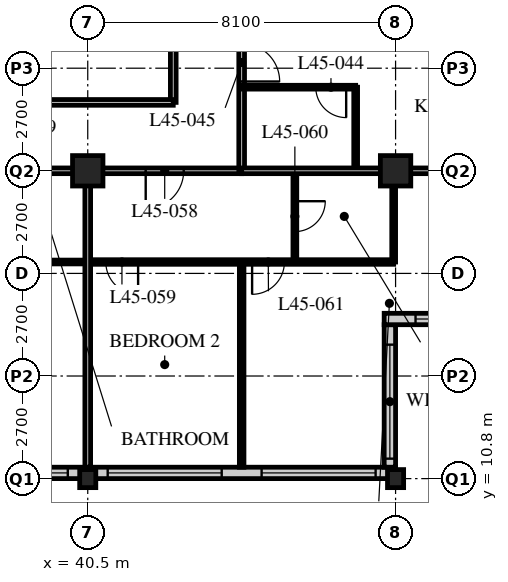
"""IFC4 building model, lengths in metres.
Left out: names, types, materials, properties, quantities, classifications, styles, units other than length and angle.
Written with IfcOpenShell. Run it as: python <this file> out.ifc"""

import sys

from ifc_helpers import new_model, si_unit, direction, frame, frame_2d, origin, origin_2d, place, context, subcontext, project, spatial, rectangle, hollow_rectangle, i_section, extrude, element, fill, save


model = new_model("IFC4")
c1 = context("Model", 3, precision=1e-05, world=origin(), true_north=direction((0.0, 1.0)))
c2 = subcontext(c1, "Body", "Model", "MODEL_VIEW")
j1 = project(units=[si_unit("LENGTHUNIT", "METRE"), si_unit("PLANEANGLEUNIT", "RADIAN")], contexts=[c1])
p1 = place(None, origin())
s1 = spatial("IfcSite", under=j1, at=p1, CompositionType="ELEMENT")
p2 = place(p1, origin())
s2 = spatial("IfcBuilding", under=s1, at=p2, CompositionType="ELEMENT")
p3 = place(p2, frame((0.0, 0.0, 177.6)))
s3 = spatial("IfcBuildingStorey", under=s2, at=p3, CompositionType="ELEMENT", Elevation=177.6)
p4 = place(p3, frame((40.5, 10.8, 0.0), z_axis=(0.0, 0.0, 1.0), x_axis=(1.0, 0.0, 0.0)))
e1 = element("IfcColumn", 1, at=p4, inside=s3, PredefinedType="COLUMN", context=c2, shape_type="SweptSolid", body=[
    extrude(i_section(OverallWidth=0.424, OverallDepth=0.475, WebThickness=0.048, FlangeThickness=0.077, FilletRadius=0.015, at=origin_2d()), origin(), (0.0, 0.0, 1.0), 3.6),
])
p5 = place(p3, frame((40.5, 18.9, 0.0), z_axis=(0.0, 0.0, 1.0), x_axis=(1.0, 0.0, 0.0)))
e2 = element("IfcColumn", 2, at=p5, inside=s3, PredefinedType="COLUMN", context=c2, shape_type="SweptSolid", body=[
    extrude(hollow_rectangle(XDim=0.8, YDim=0.8, WallThickness=0.08, at=origin_2d()), origin(), (0.0, 0.0, 1.0), 3.6),
])
p6 = place(p3, frame((48.6, 10.8, 0.0), z_axis=(0.0, 0.0, 1.0), x_axis=(1.0, 0.0, 0.0)))
e3 = element("IfcColumn", 3, at=p6, inside=s3, PredefinedType="COLUMN", context=c2, shape_type="SweptSolid", body=[
    extrude(i_section(OverallWidth=0.424, OverallDepth=0.475, WebThickness=0.048, FlangeThickness=0.077, FilletRadius=0.015, at=origin_2d()), origin(), (0.0, 0.0, 1.0), 3.6),
])
p7 = place(p3, frame((48.6, 18.9, 0.0), z_axis=(0.0, 0.0, 1.0), x_axis=(1.0, 0.0, 0.0)))
e4 = element("IfcColumn", 4, at=p7, inside=s3, PredefinedType="COLUMN", context=c2, shape_type="SweptSolid", body=[
    extrude(hollow_rectangle(XDim=0.8, YDim=0.8, WallThickness=0.08, at=origin_2d()), origin(), (0.0, 0.0, 1.0), 3.6),
])
p8 = place(p3, frame((8.4, 10.95, 0.0), z_axis=(0.0, 0.0, 1.0), x_axis=(1.0, 0.0, 0.0)))
e5 = element("IfcWall", 5, at=p8, inside=s3, PredefinedType="SOLIDWALL", context=c2, shape_type="SweptSolid", body=[
    extrude(rectangle(XDim=40.2, YDim=0.3, at=frame_2d((20.1, 0.0))), origin(), (0.0, 0.0, 1.0), 3.39),
])
p9 = place(p8, frame((0.225, 0.0, 0.6)))
e6 = element("IfcOpeningElement", 6, at=p9, cuts=e5, PredefinedType="OPENING", context=c2, shape_type="SweptSolid", body=[
    extrude(rectangle(XDim=3.0, YDim=2.4, at=frame_2d((1.5, 1.2))), frame((0.0, 0.16, 0.0), z_axis=(0.0, -1.0, 0.0), x_axis=(1.0, 0.0, 0.0)), (0.0, 0.0, 1.0), 0.32),
])
p10 = place(p8, frame((4.275, 0.0, 0.6)))
e7 = element("IfcOpeningElement", 7, at=p10, cuts=e5, PredefinedType="OPENING", context=c2, shape_type="SweptSolid", body=[
    extrude(rectangle(XDim=3.0, YDim=2.4, at=frame_2d((1.5, 1.2))), frame((0.0, 0.16, 0.0), z_axis=(0.0, -1.0, 0.0), x_axis=(1.0, 0.0, 0.0)), (0.0, 0.0, 1.0), 0.32),
])
p11 = place(p8, frame((8.325, 0.0, 0.6)))
e8 = element("IfcOpeningElement", 8, at=p11, cuts=e5, PredefinedType="OPENING", context=c2, shape_type="SweptSolid", body=[
    extrude(rectangle(XDim=3.0, YDim=2.4, at=frame_2d((1.5, 1.2))), frame((0.0, 0.16, 0.0), z_axis=(0.0, -1.0, 0.0), x_axis=(1.0, 0.0, 0.0)), (0.0, 0.0, 1.0), 0.32),
])
p12 = place(p8, frame((12.375, 0.0, 0.6)))
e9 = element("IfcOpeningElement", 9, at=p12, cuts=e5, PredefinedType="OPENING", context=c2, shape_type="SweptSolid", body=[
    extrude(rectangle(XDim=3.0, YDim=2.4, at=frame_2d((1.5, 1.2))), frame((0.0, 0.16, 0.0), z_axis=(0.0, -1.0, 0.0), x_axis=(1.0, 0.0, 0.0)), (0.0, 0.0, 1.0), 0.32),
])
p13 = place(p8, frame((16.425, 0.0, 0.6)))
e10 = element("IfcOpeningElement", 10, at=p13, cuts=e5, PredefinedType="OPENING", context=c2, shape_type="SweptSolid", body=[
    extrude(rectangle(XDim=3.0, YDim=2.4, at=frame_2d((1.5, 1.2))), frame((0.0, 0.16, 0.0), z_axis=(0.0, -1.0, 0.0), x_axis=(1.0, 0.0, 0.0)), (0.0, 0.0, 1.0), 0.32),
])
p14 = place(p8, frame((20.475, 0.0, 0.6)))
e11 = element("IfcOpeningElement", 11, at=p14, cuts=e5, PredefinedType="OPENING", context=c2, shape_type="SweptSolid", body=[
    extrude(rectangle(XDim=3.0, YDim=2.4, at=frame_2d((1.5, 1.2))), frame((0.0, 0.16, 0.0), z_axis=(0.0, -1.0, 0.0), x_axis=(1.0, 0.0, 0.0)), (0.0, 0.0, 1.0), 0.32),
])
p15 = place(p8, frame((24.525, 0.0, 0.6)))
e12 = element("IfcOpeningElement", 12, at=p15, cuts=e5, PredefinedType="OPENING", context=c2, shape_type="SweptSolid", body=[
    extrude(rectangle(XDim=3.0, YDim=2.4, at=frame_2d((1.5, 1.2))), frame((0.0, 0.16, 0.0), z_axis=(0.0, -1.0, 0.0), x_axis=(1.0, 0.0, 0.0)), (0.0, 0.0, 1.0), 0.32),
])
p16 = place(p8, frame((28.575, 0.0, 0.6)))
e13 = element("IfcOpeningElement", 13, at=p16, cuts=e5, PredefinedType="OPENING", context=c2, shape_type="SweptSolid", body=[
    extrude(rectangle(XDim=3.0, YDim=2.4, at=frame_2d((1.5, 1.2))), frame((0.0, 0.16, 0.0), z_axis=(0.0, -1.0, 0.0), x_axis=(1.0, 0.0, 0.0)), (0.0, 0.0, 1.0), 0.32),
])
p17 = place(p8, frame((32.625, 0.0, 0.6)))
e14 = element("IfcOpeningElement", 14, at=p17, cuts=e5, PredefinedType="OPENING", context=c2, shape_type="SweptSolid", body=[
    extrude(rectangle(XDim=3.0, YDim=2.4, at=frame_2d((1.5, 1.2))), frame((0.0, 0.16, 0.0), z_axis=(0.0, -1.0, 0.0), x_axis=(1.0, 0.0, 0.0)), (0.0, 0.0, 1.0), 0.32),
])
p18 = place(p8, frame((36.675, 0.0, 0.6)))
e15 = element("IfcOpeningElement", 15, at=p18, cuts=e5, PredefinedType="OPENING", context=c2, shape_type="SweptSolid", body=[
    extrude(rectangle(XDim=3.0, YDim=2.4, at=frame_2d((1.5, 1.2))), frame((0.0, 0.16, 0.0), z_axis=(0.0, -1.0, 0.0), x_axis=(1.0, 0.0, 0.0)), (0.0, 0.0, 1.0), 0.32),
])
p19 = place(p3, frame((48.45, 11.1, 0.0), z_axis=(0.0, 0.0, 1.0), x_axis=(0.0, 1.0, 0.0)))
e16 = element("IfcWall", 16, at=p19, inside=s3, PredefinedType="SOLIDWALL", context=c2, shape_type="SweptSolid", body=[
    extrude(rectangle(XDim=3.75, YDim=0.3, at=frame_2d((1.875, 0.0))), origin(), (0.0, 0.0, 1.0), 3.39),
])
p20 = place(p19, frame((0.225, 0.0, 0.6)))
e17 = element("IfcOpeningElement", 17, at=p20, cuts=e16, PredefinedType="OPENING", context=c2, shape_type="SweptSolid", body=[
    extrude(rectangle(XDim=3.0, YDim=2.0, at=frame_2d((1.5, 1.0))), frame((0.0, 0.16, 0.0), z_axis=(0.0, -1.0, 0.0), x_axis=(1.0, 0.0, 0.0)), (0.0, 0.0, 1.0), 0.32),
])
p21 = place(p3, frame((48.3, 15.0, 0.0), z_axis=(0.0, 0.0, 1.0), x_axis=(1.0, 0.0, 0.0)))
e18 = element("IfcWall", 18, at=p21, inside=s3, PredefinedType="SOLIDWALL", context=c2, shape_type="SweptSolid", body=[
    extrude(rectangle(XDim=4.35, YDim=0.3, at=frame_2d((2.175, 0.0))), origin(), (0.0, 0.0, 1.0), 3.39),
])
p22 = place(p21, frame((0.825, 0.0, 0.6)))
e19 = element("IfcOpeningElement", 19, at=p22, cuts=e18, PredefinedType="OPENING", context=c2, shape_type="SweptSolid", body=[
    extrude(rectangle(XDim=3.0, YDim=2.0, at=frame_2d((1.5, 1.0))), frame((0.0, 0.16, 0.0), z_axis=(0.0, -1.0, 0.0), x_axis=(1.0, 0.0, 0.0)), (0.0, 0.0, 1.0), 0.32),
])
p23 = place(p3, frame((12.15, 18.9, 0.0), z_axis=(0.0, 0.0, 1.0), x_axis=(1.0, 0.0, 0.0)))
e20 = element("IfcWall", 20, at=p23, inside=s3, PredefinedType="PARTITIONING", context=c2, shape_type="SweptSolid", body=[
    extrude(rectangle(XDim=32.4, YDim=0.15, at=frame_2d((16.2, 0.0))), origin(), (0.0, 0.0, 1.0), 2.778),
])
p24 = place(p23, frame((6.4, 0.0, 0.0)))
e21 = element("IfcOpeningElement", 21, at=p24, cuts=e20, PredefinedType="OPENING", context=c2, shape_type="SweptSolid", body=[
    extrude(rectangle(XDim=1.0, YDim=2.1, at=frame_2d((0.5, 1.05))), frame((0.0, 0.085, 0.0), z_axis=(0.0, -1.0, 0.0), x_axis=(1.0, 0.0, 0.0)), (0.0, 0.0, 1.0), 0.17),
])
p25 = place(p23, frame((8.8, 0.0, 0.0)))
e22 = element("IfcOpeningElement", 22, at=p25, cuts=e20, PredefinedType="OPENING", context=c2, shape_type="SweptSolid", body=[
    extrude(rectangle(XDim=1.0, YDim=2.1, at=frame_2d((0.5, 1.05))), frame((0.0, 0.085, 0.0), z_axis=(0.0, -1.0, 0.0), x_axis=(1.0, 0.0, 0.0)), (0.0, 0.0, 1.0), 0.17),
])
p26 = place(p23, frame((13.05, 0.0, 0.0)))
e23 = element("IfcOpeningElement", 23, at=p26, cuts=e20, PredefinedType="OPENING", context=c2, shape_type="SweptSolid", body=[
    extrude(rectangle(XDim=1.0, YDim=2.1, at=frame_2d((0.5, 1.05))), frame((0.0, 0.085, 0.0), z_axis=(0.0, -1.0, 0.0), x_axis=(1.0, 0.0, 0.0)), (0.0, 0.0, 1.0), 0.17),
])
p27 = place(p23, frame((22.6, 0.0, 0.0)))
e24 = element("IfcOpeningElement", 24, at=p27, cuts=e20, PredefinedType="OPENING", context=c2, shape_type="SweptSolid", body=[
    extrude(rectangle(XDim=1.0, YDim=2.1, at=frame_2d((0.5, 1.05))), frame((0.0, 0.085, 0.0), z_axis=(0.0, -1.0, 0.0), x_axis=(1.0, 0.0, 0.0)), (0.0, 0.0, 1.0), 0.17),
])
p28 = place(p23, frame((25.0, 0.0, 0.0)))
e25 = element("IfcOpeningElement", 25, at=p28, cuts=e20, PredefinedType="OPENING", context=c2, shape_type="SweptSolid", body=[
    extrude(rectangle(XDim=1.0, YDim=2.1, at=frame_2d((0.5, 1.05))), frame((0.0, 0.085, 0.0), z_axis=(0.0, -1.0, 0.0), x_axis=(1.0, 0.0, 0.0)), (0.0, 0.0, 1.0), 0.17),
])
p29 = place(p23, frame((1.525, 0.0, 0.0)))
e26 = element("IfcOpeningElement", 26, at=p29, cuts=e20, PredefinedType="OPENING", context=c2, shape_type="SweptSolid", body=[
    extrude(rectangle(XDim=1.0, YDim=2.1, at=frame_2d((0.5, 1.05))), frame((0.0, 0.085, 0.0), z_axis=(0.0, -1.0, 0.0), x_axis=(1.0, 0.0, 0.0)), (0.0, 0.0, 1.0), 0.17),
])
p30 = place(p23, frame((29.875, 0.0, 0.0)))
e27 = element("IfcOpeningElement", 27, at=p30, cuts=e20, PredefinedType="OPENING", context=c2, shape_type="SweptSolid", body=[
    extrude(rectangle(XDim=1.0, YDim=2.1, at=frame_2d((0.5, 1.05))), frame((0.0, 0.085, 0.0), z_axis=(0.0, -1.0, 0.0), x_axis=(1.0, 0.0, 0.0)), (0.0, 0.0, 1.0), 0.17),
])
p31 = place(p3, frame((44.55, 18.9, 0.0), z_axis=(0.0, 0.0, 1.0), x_axis=(0.0, 1.0, 0.0)))
e28 = element("IfcWall", 28, at=p31, inside=s3, PredefinedType="PARTITIONING", context=c2, shape_type="SweptSolid", body=[
    extrude(rectangle(XDim=24.3, YDim=0.15, at=frame_2d((12.15, 0.0))), origin(), (0.0, 0.0, 1.0), 3.39),
])
p32 = place(p31, frame((2.35, 0.0, 0.0)))
e29 = element("IfcOpeningElement", 29, at=p32, cuts=e28, PredefinedType="OPENING", context=c2, shape_type="SweptSolid", body=[
    extrude(rectangle(XDim=1.0, YDim=2.1, at=frame_2d((0.5, 1.05))), frame((0.0, 0.085, 0.0), z_axis=(0.0, -1.0, 0.0), x_axis=(1.0, 0.0, 0.0)), (0.0, 0.0, 1.0), 0.17),
])
p33 = place(p31, frame((4.45, 0.0, 0.0)))
e30 = element("IfcOpeningElement", 30, at=p33, cuts=e28, PredefinedType="OPENING", context=c2, shape_type="SweptSolid", body=[
    extrude(rectangle(XDim=1.0, YDim=2.1, at=frame_2d((0.5, 1.05))), frame((0.0, 0.085, 0.0), z_axis=(0.0, -1.0, 0.0), x_axis=(1.0, 0.0, 0.0)), (0.0, 0.0, 1.0), 0.17),
])
p34 = place(p31, frame((18.55, 0.0, 0.0)))
e31 = element("IfcOpeningElement", 31, at=p34, cuts=e28, PredefinedType="OPENING", context=c2, shape_type="SweptSolid", body=[
    extrude(rectangle(XDim=1.0, YDim=2.1, at=frame_2d((0.5, 1.05))), frame((0.0, 0.085, 0.0), z_axis=(0.0, -1.0, 0.0), x_axis=(1.0, 0.0, 0.0)), (0.0, 0.0, 1.0), 0.17),
])
p35 = place(p31, frame((22.6, 0.0, 0.0)))
e32 = element("IfcOpeningElement", 32, at=p35, cuts=e28, PredefinedType="OPENING", context=c2, shape_type="SweptSolid", body=[
    extrude(rectangle(XDim=1.0, YDim=2.1, at=frame_2d((0.5, 1.05))), frame((0.0, 0.085, 0.0), z_axis=(0.0, -1.0, 0.0), x_axis=(1.0, 0.0, 0.0)), (0.0, 0.0, 1.0), 0.17),
])
p36 = place(p3, frame((42.75, 20.7, 0.0), z_axis=(0.0, 0.0, 1.0), x_axis=(0.0, 1.0, 0.0)))
e33 = element("IfcWall", 33, at=p36, inside=s3, PredefinedType="PARTITIONING", context=c2, shape_type="SweptSolid", body=[
    extrude(rectangle(XDim=19.8, YDim=0.15, at=frame_2d((9.9, 0.0))), origin(), (0.0, 0.0, 1.0), 3.39),
])
p37 = place(p36, frame((7.15, 0.0, 0.0)))
e34 = element("IfcOpeningElement", 34, at=p37, cuts=e33, PredefinedType="OPENING", context=c2, shape_type="SweptSolid", body=[
    extrude(rectangle(XDim=1.0, YDim=2.1, at=frame_2d((0.5, 1.05))), frame((0.0, 0.085, 0.0), z_axis=(0.0, -1.0, 0.0), x_axis=(1.0, 0.0, 0.0)), (0.0, 0.0, 1.0), 0.17),
])
p38 = place(p36, frame((15.25, 0.0, 0.0)))
e35 = element("IfcOpeningElement", 35, at=p38, cuts=e33, PredefinedType="OPENING", context=c2, shape_type="SweptSolid", body=[
    extrude(rectangle(XDim=1.0, YDim=2.1, at=frame_2d((0.5, 1.05))), frame((0.0, 0.085, 0.0), z_axis=(0.0, -1.0, 0.0), x_axis=(1.0, 0.0, 0.0)), (0.0, 0.0, 1.0), 0.17),
])
p39 = place(p3, frame((29.56, 20.7, 0.0), z_axis=(0.0, 0.0, 1.0), x_axis=(1.0, 0.0, 0.0)))
e36 = element("IfcWall", 36, at=p39, inside=s3, PredefinedType="PARTITIONING", context=c2, shape_type="SweptSolid", body=[
    extrude(rectangle(XDim=13.19, YDim=0.15, at=frame_2d((6.595, 0.0))), origin(), (0.0, 0.0, 1.0), 3.39),
])
p40 = place(p39, frame((6.09, 0.0, 0.0)))
e37 = element("IfcOpeningElement", 37, at=p40, cuts=e36, PredefinedType="OPENING", context=c2, shape_type="SweptSolid", body=[
    extrude(rectangle(XDim=1.0, YDim=2.1, at=frame_2d((0.5, 1.05))), frame((0.0, 0.085, 0.0), z_axis=(0.0, -1.0, 0.0), x_axis=(1.0, 0.0, 0.0)), (0.0, 0.0, 1.0), 0.17),
])
p41 = place(p3, frame((38.3, 16.5, 0.0), z_axis=(0.0, 0.0, 1.0), x_axis=(1.0, 0.0, 0.0)))
e38 = element("IfcWall", 38, at=p41, inside=s3, PredefinedType="PARTITIONING", context=c2, shape_type="SweptSolid", body=[
    extrude(rectangle(XDim=2.2, YDim=0.1, at=frame_2d((1.1, 0.0))), origin(), (0.0, 0.0, 1.0), 3.39),
])
p42 = place(p3, frame((47.55, 18.9, 0.0), z_axis=(0.0, 0.0, 1.0), x_axis=(0.0, 1.0, 0.0)))
e39 = element("IfcWall", 39, at=p42, inside=s3, PredefinedType="PARTITIONING", context=c2, shape_type="SweptSolid", body=[
    extrude(rectangle(XDim=2.2, YDim=0.1, at=frame_2d((1.1, 0.0))), origin(), (0.0, 0.0, 1.0), 3.39),
])
p43 = place(p3, frame((44.55, 21.1, 0.0), z_axis=(0.0, 0.0, 1.0), x_axis=(1.0, 0.0, 0.0)))
e40 = element("IfcWall", 40, at=p43, inside=s3, PredefinedType="PARTITIONING", context=c2, shape_type="SweptSolid", body=[
    extrude(rectangle(XDim=3.0, YDim=0.1, at=frame_2d((1.5, 0.0))), origin(), (0.0, 0.0, 1.0), 3.39),
])
p44 = place(p43, frame((1.95, 0.0, 0.0)))
e41 = element("IfcOpeningElement", 41, at=p44, cuts=e40, PredefinedType="OPENING", context=c2, shape_type="SweptSolid", body=[
    extrude(rectangle(XDim=0.8, YDim=2.1, at=frame_2d((0.4, 1.05))), frame((0.0, 0.06, 0.0), z_axis=(0.0, -1.0, 0.0), x_axis=(1.0, 0.0, 0.0)), (0.0, 0.0, 1.0), 0.12),
])
p45 = place(p3, frame((40.5, 16.5, 0.0), z_axis=(0.0, 0.0, 1.0), x_axis=(1.0, 0.0, 0.0)))
e42 = element("IfcWall", 42, at=p45, inside=s3, PredefinedType="PARTITIONING", context=c2, shape_type="SweptSolid", body=[
    extrude(rectangle(XDim=8.05, YDim=0.12, at=frame_2d((4.025, 0.0))), origin(), (0.0, 0.0, 1.0), 3.39),
])
p46 = place(p45, frame((0.475, 0.0, 0.0)))
e43 = element("IfcOpeningElement", 43, at=p46, cuts=e42, PredefinedType="OPENING", context=c2, shape_type="SweptSolid", body=[
    extrude(rectangle(XDim=0.85, YDim=2.1, at=frame_2d((0.425, 1.05))), frame((0.0, 0.07, 0.0), z_axis=(0.0, -1.0, 0.0), x_axis=(1.0, 0.0, 0.0)), (0.0, 0.0, 1.0), 0.14),
])
p47 = place(p45, frame((4.325, 0.0, 0.0)))
e44 = element("IfcOpeningElement", 44, at=p47, cuts=e42, PredefinedType="OPENING", context=c2, shape_type="SweptSolid", body=[
    extrude(rectangle(XDim=0.85, YDim=2.1, at=frame_2d((0.425, 1.05))), frame((0.0, 0.07, 0.0), z_axis=(0.0, -1.0, 0.0), x_axis=(1.0, 0.0, 0.0)), (0.0, 0.0, 1.0), 0.14),
])
p48 = place(p3, frame((45.95, 18.9, 0.0), z_axis=(0.0, 0.0, 1.0), x_axis=(0.0, -1.0, 0.0)))
e45 = element("IfcWall", 45, at=p48, inside=s3, PredefinedType="PARTITIONING", context=c2, shape_type="SweptSolid", body=[
    extrude(rectangle(XDim=2.4, YDim=0.1, at=frame_2d((1.2, 0.0))), origin(), (0.0, 0.0, 1.0), 3.39),
])
p49 = place(p48, frame((0.8, 0.0, 0.0)))
e46 = element("IfcOpeningElement", 46, at=p49, cuts=e45, PredefinedType="OPENING", context=c2, shape_type="SweptSolid", body=[
    extrude(rectangle(XDim=0.8, YDim=2.1, at=frame_2d((0.4, 1.05))), frame((0.0, 0.06, 0.0), z_axis=(0.0, -1.0, 0.0), x_axis=(1.0, 0.0, 0.0)), (0.0, 0.0, 1.0), 0.12),
])
p50 = place(p3, frame((48.55, 18.9, 0.0), z_axis=(0.0, 0.0, 1.0), x_axis=(0.0, -1.0, 0.0)))
e47 = element("IfcWall", 47, at=p50, inside=s3, PredefinedType="PARTITIONING", context=c2, shape_type="SweptSolid", body=[
    extrude(rectangle(XDim=2.4, YDim=0.1, at=frame_2d((1.2, 0.0))), origin(), (0.0, 0.0, 1.0), 2.778),
])
p51 = place(p3, frame((44.55, 16.5, 0.0), z_axis=(0.0, 0.0, 1.0), x_axis=(0.0, -1.0, 0.0)))
e48 = element("IfcWall", 48, at=p51, inside=s3, PredefinedType="PARTITIONING", context=c2, shape_type="SweptSolid", body=[
    extrude(rectangle(XDim=5.4, YDim=0.12, at=frame_2d((2.7, 0.0))), origin(), (0.0, 0.0, 1.0), 3.39),
])
p52 = place(p3, frame((44.55, 18.9, 0.0), z_axis=(0.0, 0.0, 1.0), x_axis=(1.0, 0.0, 0.0)))
e49 = element("IfcWall", 49, at=p52, inside=s3, PredefinedType="PARTITIONING", context=c2, shape_type="SweptSolid", body=[
    extrude(rectangle(XDim=7.8, YDim=0.15, at=frame_2d((3.9, 0.0))), origin(), (0.0, 0.0, 1.0), 2.778),
])
p53 = place(p3, frame((40.5, 18.9, 0.0), z_axis=(0.0, 0.0, 1.0), x_axis=(0.0, -1.0, 0.0)))
e50 = element("IfcWall", 50, at=p53, inside=s3, PredefinedType="PARTITIONING", context=c2, shape_type="SweptSolid", body=[
    extrude(rectangle(XDim=7.8, YDim=0.15, at=frame_2d((3.9, 0.0))), origin(), (0.0, 0.0, 1.0), 2.778),
])
p54 = place(p16, origin())
e51 = element("IfcWindow", 51, at=p54, inside=s3, PartitioningType="SINGLE_PANEL", PredefinedType="WINDOW", context=c2, shape_type="SweptSolid", body=[
    extrude(rectangle(XDim=3.0, YDim=2.4, at=frame_2d((1.5, 1.2))), frame((0.0, 0.03, 0.0), z_axis=(0.0, -1.0, 0.0), x_axis=(1.0, 0.0, 0.0)), (0.0, 0.0, 1.0), 0.06),
])
fill(e13, e51)
p55 = place(p17, origin())
e52 = element("IfcWindow", 52, at=p55, inside=s3, PartitioningType="SINGLE_PANEL", PredefinedType="WINDOW", context=c2, shape_type="SweptSolid", body=[
    extrude(rectangle(XDim=3.0, YDim=2.4, at=frame_2d((1.5, 1.2))), frame((0.0, 0.03, 0.0), z_axis=(0.0, -1.0, 0.0), x_axis=(1.0, 0.0, 0.0)), (0.0, 0.0, 1.0), 0.06),
])
fill(e14, e52)
p56 = place(p18, origin())
e53 = element("IfcWindow", 53, at=p56, inside=s3, PartitioningType="SINGLE_PANEL", PredefinedType="WINDOW", context=c2, shape_type="SweptSolid", body=[
    extrude(rectangle(XDim=3.0, YDim=2.4, at=frame_2d((1.5, 1.2))), frame((0.0, 0.03, 0.0), z_axis=(0.0, -1.0, 0.0), x_axis=(1.0, 0.0, 0.0)), (0.0, 0.0, 1.0), 0.06),
])
fill(e15, e53)
p57 = place(p20, origin())
e54 = element("IfcWindow", 54, at=p57, inside=s3, PartitioningType="SINGLE_PANEL", PredefinedType="WINDOW", context=c2, shape_type="SweptSolid", body=[
    extrude(rectangle(XDim=3.0, YDim=2.0, at=frame_2d((1.5, 1.0))), frame((0.0, 0.03, 0.0), z_axis=(0.0, -1.0, 0.0), x_axis=(1.0, 0.0, 0.0)), (0.0, 0.0, 1.0), 0.06),
])
fill(e17, e54)
p58 = place(p22, origin())
e55 = element("IfcWindow", 55, at=p58, inside=s3, PartitioningType="SINGLE_PANEL", PredefinedType="WINDOW", context=c2, shape_type="SweptSolid", body=[
    extrude(rectangle(XDim=3.0, YDim=2.0, at=frame_2d((1.5, 1.0))), frame((0.0, 0.03, 0.0), z_axis=(0.0, -1.0, 0.0), x_axis=(1.0, 0.0, 0.0)), (0.0, 0.0, 1.0), 0.06),
])
fill(e19, e55)
p59 = place(p44, origin())
e56 = element("IfcDoor", 56, at=p59, inside=s3, OperationType="SINGLE_SWING_LEFT", PredefinedType="DOOR", context=c2, shape_type="SweptSolid", body=[
    extrude(rectangle(XDim=0.8, YDim=2.1, at=frame_2d((0.4, 1.05))), frame((0.0, 0.025, 0.0), z_axis=(0.0, -1.0, 0.0), x_axis=(1.0, 0.0, 0.0)), (0.0, 0.0, 1.0), 0.05),
])
fill(e41, e56)
p60 = place(p32, origin())
e57 = element("IfcDoor", 57, at=p60, inside=s3, OperationType="SINGLE_SWING_RIGHT", PredefinedType="DOOR", context=c2, shape_type="SweptSolid", body=[
    extrude(rectangle(XDim=1.0, YDim=2.1, at=frame_2d((0.5, 1.05))), frame((0.0, 0.025, 0.0), z_axis=(0.0, -1.0, 0.0), x_axis=(1.0, 0.0, 0.0)), (0.0, 0.0, 1.0), 0.05),
])
fill(e29, e57)
p61 = place(p30, origin())
e58 = element("IfcDoor", 58, at=p61, inside=s3, OperationType="SINGLE_SWING_RIGHT", PredefinedType="DOOR", context=c2, shape_type="SweptSolid", body=[
    extrude(rectangle(XDim=1.0, YDim=2.1, at=frame_2d((0.5, 1.05))), frame((0.0, 0.025, 0.0), z_axis=(0.0, -1.0, 0.0), x_axis=(1.0, 0.0, 0.0)), (0.0, 0.0, 1.0), 0.05),
])
fill(e27, e58)
p62 = place(p46, origin())
e59 = element("IfcDoor", 59, at=p62, inside=s3, OperationType="SINGLE_SWING_LEFT", PredefinedType="DOOR", context=c2, shape_type="SweptSolid", body=[
    extrude(rectangle(XDim=0.85, YDim=2.1, at=frame_2d((0.425, 1.05))), frame((0.0, 0.025, 0.0), z_axis=(0.0, -1.0, 0.0), x_axis=(1.0, 0.0, 0.0)), (0.0, 0.0, 1.0), 0.05),
])
fill(e43, e59)
p63 = place(p49, origin())
e60 = element("IfcDoor", 60, at=p63, inside=s3, OperationType="SINGLE_SWING_LEFT", PredefinedType="DOOR", context=c2, shape_type="SweptSolid", body=[
    extrude(rectangle(XDim=0.8, YDim=2.1, at=frame_2d((0.4, 1.05))), frame((0.0, 0.025, 0.0), z_axis=(0.0, -1.0, 0.0), x_axis=(1.0, 0.0, 0.0)), (0.0, 0.0, 1.0), 0.05),
])
fill(e46, e60)
p64 = place(p47, origin())
e61 = element("IfcDoor", 61, at=p64, inside=s3, OperationType="SINGLE_SWING_RIGHT", PredefinedType="DOOR", context=c2, shape_type="SweptSolid", body=[
    extrude(rectangle(XDim=0.85, YDim=2.1, at=frame_2d((0.425, 1.05))), frame((0.0, 0.025, 0.0), z_axis=(0.0, -1.0, 0.0), x_axis=(1.0, 0.0, 0.0)), (0.0, 0.0, 1.0), 0.05),
])
fill(e44, e61)
save(model, sys.argv[1])
